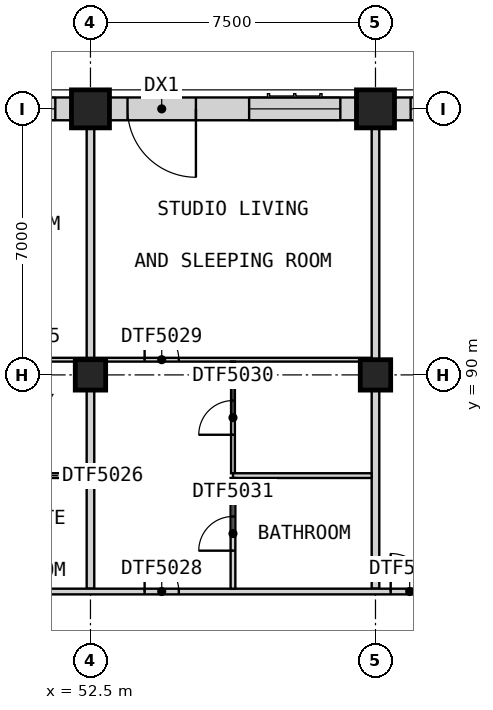
"""IFC4 building model, lengths in metres.
Left out: names, types, materials, properties, quantities, classifications, styles, units other than length and angle.
Written with IfcOpenShell. Run it as: python <this file> out.ifc"""

import sys

from ifc_helpers import new_model, si_unit, direction, frame, frame_2d, origin, origin_2d, place, context, subcontext, project, spatial, rectangle, extrude, element, fill, save


model = new_model("IFC4")
c1 = context("Model", 3, precision=1e-05, world=origin(), true_north=direction((0.0, 1.0)))
c2 = subcontext(c1, "Body", "Model", "MODEL_VIEW")
j1 = project(units=[si_unit("LENGTHUNIT", "METRE"), si_unit("PLANEANGLEUNIT", "RADIAN")], contexts=[c1])
p1 = place(None, origin())
s1 = spatial("IfcSite", under=j1, at=p1, CompositionType="ELEMENT")
p2 = place(p1, origin())
s2 = spatial("IfcBuilding", under=s1, at=p2, CompositionType="ELEMENT")
p3 = place(p2, frame((0.0, 0.0, 219.7)))
s3 = spatial("IfcBuildingStorey", under=s2, at=p3, CompositionType="ELEMENT", Elevation=219.7)
p4 = place(p3, frame((52.5, 90.0, 0.0), z_axis=(0.0, 0.0, 1.0), x_axis=(1.0, 0.0, 0.0)))
e1 = element("IfcColumn", 1, at=p4, inside=s3, PredefinedType="COLUMN", context=c2, shape_type="SweptSolid", body=[
    extrude(rectangle(XDim=0.8, YDim=0.8, at=origin_2d()), origin(), (0.0, 0.0, 1.0), 3.5),
])
p5 = place(p3, frame((52.5, 97.0, 0.0), z_axis=(0.0, 0.0, 1.0), x_axis=(1.0, 0.0, 0.0)))
e2 = element("IfcColumn", 2, at=p5, inside=s3, PredefinedType="COLUMN", context=c2, shape_type="SweptSolid", body=[
    extrude(rectangle(XDim=1.0, YDim=1.0, at=origin_2d()), origin(), (0.0, 0.0, 1.0), 3.5),
])
p6 = place(p3, frame((60.0, 90.0, 0.0), z_axis=(0.0, 0.0, 1.0), x_axis=(1.0, 0.0, 0.0)))
e3 = element("IfcColumn", 3, at=p6, inside=s3, PredefinedType="COLUMN", context=c2, shape_type="SweptSolid", body=[
    extrude(rectangle(XDim=0.8, YDim=0.8, at=origin_2d()), origin(), (0.0, 0.0, 1.0), 3.5),
])
p7 = place(p3, frame((60.0, 97.0, 0.0), z_axis=(0.0, 0.0, 1.0), x_axis=(1.0, 0.0, 0.0)))
e4 = element("IfcColumn", 4, at=p7, inside=s3, PredefinedType="COLUMN", context=c2, shape_type="SweptSolid", body=[
    extrude(rectangle(XDim=1.0, YDim=1.0, at=origin_2d()), origin(), (0.0, 0.0, 1.0), 3.5),
])
p8 = place(p3, frame((67.0, 97.0, 0.0), z_axis=(0.0, 0.0, 1.0), x_axis=(-1.0, 0.0, 0.0)))
e5 = element("IfcWall", 5, at=p8, inside=s3, PredefinedType="SOLIDWALL", context=c2, shape_type="SweptSolid", body=[
    extrude(rectangle(XDim=6.5, YDim=0.6, at=frame_2d((3.25, 0.0))), origin(), (0.0, 0.0, 1.0), 2.75),
])
p9 = place(p8, frame((3.675, 0.0, 0.8)))
e6 = element("IfcOpeningElement", 6, at=p9, cuts=e5, PredefinedType="OPENING", context=c2, shape_type="SweptSolid", body=[
    extrude(rectangle(XDim=2.4, YDim=1.8, at=frame_2d((1.2, 0.9))), frame((0.0, 0.31, 0.0), z_axis=(0.0, -1.0, 0.0), x_axis=(1.0, 0.0, 0.0)), (0.0, 0.0, 1.0), 0.62),
])
p10 = place(p8, frame((0.425, 0.0, 0.8)))
e7 = element("IfcOpeningElement", 7, at=p10, cuts=e5, PredefinedType="OPENING", context=c2, shape_type="SweptSolid", body=[
    extrude(rectangle(XDim=2.4, YDim=1.8, at=frame_2d((1.2, 0.9))), frame((0.0, 0.31, 0.0), z_axis=(0.0, -1.0, 0.0), x_axis=(1.0, 0.0, 0.0)), (0.0, 0.0, 1.0), 0.62),
])
p11 = place(p3, frame((59.5, 97.0, 0.0), z_axis=(0.0, 0.0, 1.0), x_axis=(-1.0, 0.0, 0.0)))
e8 = element("IfcWall", 8, at=p11, inside=s3, PredefinedType="SOLIDWALL", context=c2, shape_type="SweptSolid", body=[
    extrude(rectangle(XDim=6.5, YDim=0.6, at=frame_2d((3.25, 0.0))), origin(), (0.0, 0.0, 1.0), 2.75),
])
p12 = place(p11, frame((4.225, 0.0, 0.0)))
e9 = element("IfcOpeningElement", 9, at=p12, cuts=e8, PredefinedType="OPENING", context=c2, shape_type="SweptSolid", body=[
    extrude(rectangle(XDim=1.8, YDim=2.4, at=frame_2d((0.9, 1.2))), frame((0.0, 0.31, 0.0), z_axis=(0.0, -1.0, 0.0), x_axis=(1.0, 0.0, 0.0)), (0.0, 0.0, 1.0), 0.62),
])
p13 = place(p11, frame((0.425, 0.0, 0.8)))
e10 = element("IfcOpeningElement", 10, at=p13, cuts=e8, PredefinedType="OPENING", context=c2, shape_type="SweptSolid", body=[
    extrude(rectangle(XDim=2.4, YDim=1.8, at=frame_2d((1.2, 0.9))), frame((0.0, 0.31, 0.0), z_axis=(0.0, -1.0, 0.0), x_axis=(1.0, 0.0, 0.0)), (0.0, 0.0, 1.0), 0.62),
])
p14 = place(p3, frame((52.0, 97.0, 0.0), z_axis=(0.0, 0.0, 1.0), x_axis=(-1.0, 0.0, 0.0)))
e11 = element("IfcWall", 11, at=p14, inside=s3, PredefinedType="SOLIDWALL", context=c2, shape_type="SweptSolid", body=[
    extrude(rectangle(XDim=6.5, YDim=0.6, at=frame_2d((3.25, 0.0))), origin(), (0.0, 0.0, 1.0), 2.75),
])
p15 = place(p14, frame((3.675, 0.0, 0.8)))
e12 = element("IfcOpeningElement", 12, at=p15, cuts=e11, PredefinedType="OPENING", context=c2, shape_type="SweptSolid", body=[
    extrude(rectangle(XDim=2.4, YDim=1.8, at=frame_2d((1.2, 0.9))), frame((0.0, 0.31, 0.0), z_axis=(0.0, -1.0, 0.0), x_axis=(1.0, 0.0, 0.0)), (0.0, 0.0, 1.0), 0.62),
])
p16 = place(p14, frame((0.425, 0.0, 0.8)))
e13 = element("IfcOpeningElement", 13, at=p16, cuts=e11, PredefinedType="OPENING", context=c2, shape_type="SweptSolid", body=[
    extrude(rectangle(XDim=2.4, YDim=1.8, at=frame_2d((1.2, 0.9))), frame((0.0, 0.31, 0.0), z_axis=(0.0, -1.0, 0.0), x_axis=(1.0, 0.0, 0.0)), (0.0, 0.0, 1.0), 0.62),
])
for number, where, z_axis, x_axis in (
    (14, (52.5, 84.375, 0.0), (0.0, 0.0, 1.0), (0.0, 1.0, 0.0)),
    (15, (60.0, 84.375, 0.0), (0.0, 0.0, 1.0), (0.0, 1.0, 0.0)),
):
    element("IfcWall", number, at=place(p3, frame(where, z_axis=z_axis, x_axis=x_axis)), inside=s3, PredefinedType="PARTITIONING", context=c2, shape_type="SweptSolid", body=[
        extrude(rectangle(XDim=13.125, YDim=0.2, at=frame_2d((6.562, 0.0))), origin(), (0.0, 0.0, 1.0), 3.25),
    ])
p17 = place(p3, frame((33.75, 84.3, 0.0), z_axis=(0.0, 0.0, 1.0), x_axis=(1.0, 0.0, 0.0)))
e16 = element("IfcWall", 16, at=p17, inside=s3, PredefinedType="PARTITIONING", context=c2, shape_type="SweptSolid", body=[
    extrude(rectangle(XDim=28.05, YDim=0.15, at=frame_2d((14.025, 0.0))), origin(), (0.0, 0.0, 1.0), 3.25),
])
p18 = place(p17, frame((3.25, 0.0, 0.0)))
e17 = element("IfcOpeningElement", 17, at=p18, cuts=e16, PredefinedType="OPENING", context=c2, shape_type="SweptSolid", body=[
    extrude(rectangle(XDim=1.0, YDim=2.1, at=frame_2d((0.5, 1.05))), frame((0.0, 0.085, 0.0), z_axis=(0.0, -1.0, 0.0), x_axis=(1.0, 0.0, 0.0)), (0.0, 0.0, 1.0), 0.17),
])
p19 = place(p17, frame((8.925, 0.0, 0.0)))
e18 = element("IfcOpeningElement", 18, at=p19, cuts=e16, PredefinedType="OPENING", context=c2, shape_type="SweptSolid", body=[
    extrude(rectangle(XDim=0.9, YDim=2.1, at=frame_2d((0.45, 1.05))), frame((0.0, 0.085, 0.0), z_axis=(0.0, -1.0, 0.0), x_axis=(1.0, 0.0, 0.0)), (0.0, 0.0, 1.0), 0.17),
])
p20 = place(p17, frame((20.175, 0.0, 0.0)))
e19 = element("IfcOpeningElement", 19, at=p20, cuts=e16, PredefinedType="OPENING", context=c2, shape_type="SweptSolid", body=[
    extrude(rectangle(XDim=0.9, YDim=2.1, at=frame_2d((0.45, 1.05))), frame((0.0, 0.085, 0.0), z_axis=(0.0, -1.0, 0.0), x_axis=(1.0, 0.0, 0.0)), (0.0, 0.0, 1.0), 0.17),
])
p21 = place(p17, frame((26.65, 0.0, 0.0)))
e20 = element("IfcOpeningElement", 20, at=p21, cuts=e16, PredefinedType="OPENING", context=c2, shape_type="SweptSolid", body=[
    extrude(rectangle(XDim=1.0, YDim=2.1, at=frame_2d((0.5, 1.05))), frame((0.0, 0.085, 0.0), z_axis=(0.0, -1.0, 0.0), x_axis=(1.0, 0.0, 0.0)), (0.0, 0.0, 1.0), 0.17),
])
p22 = place(p3, frame((41.35, 90.4, 0.0), z_axis=(0.0, 0.0, 1.0), x_axis=(1.0, 0.0, 0.0)))
e21 = element("IfcWall", 21, at=p22, inside=s3, PredefinedType="PARTITIONING", context=c2, shape_type="SweptSolid", body=[
    extrude(rectangle(XDim=18.55, YDim=0.1, at=frame_2d((9.275, 0.0))), origin(), (0.0, 0.0, 1.0), 3.25),
])
p23 = place(p22, frame((1.325, 0.0, 0.0)))
e22 = element("IfcOpeningElement", 22, at=p23, cuts=e21, PredefinedType="OPENING", context=c2, shape_type="SweptSolid", body=[
    extrude(rectangle(XDim=0.9, YDim=2.1, at=frame_2d((0.45, 1.05))), frame((0.0, 0.06, 0.0), z_axis=(0.0, -1.0, 0.0), x_axis=(1.0, 0.0, 0.0)), (0.0, 0.0, 1.0), 0.12),
])
p24 = place(p22, frame((8.825, 0.0, 0.0)))
e23 = element("IfcOpeningElement", 23, at=p24, cuts=e21, PredefinedType="OPENING", context=c2, shape_type="SweptSolid", body=[
    extrude(rectangle(XDim=0.9, YDim=2.1, at=frame_2d((0.45, 1.05))), frame((0.0, 0.06, 0.0), z_axis=(0.0, -1.0, 0.0), x_axis=(1.0, 0.0, 0.0)), (0.0, 0.0, 1.0), 0.12),
])
p25 = place(p22, frame((12.575, 0.0, 0.0)))
e24 = element("IfcOpeningElement", 24, at=p25, cuts=e21, PredefinedType="OPENING", context=c2, shape_type="SweptSolid", body=[
    extrude(rectangle(XDim=0.9, YDim=2.1, at=frame_2d((0.45, 1.05))), frame((0.0, 0.06, 0.0), z_axis=(0.0, -1.0, 0.0), x_axis=(1.0, 0.0, 0.0)), (0.0, 0.0, 1.0), 0.12),
])
p26 = place(p3, frame((56.25, 87.413, 0.0), z_axis=(0.0, 0.0, 1.0), x_axis=(0.0, 1.0, 0.0)))
e25 = element("IfcWall", 25, at=p26, inside=s3, PredefinedType="PARTITIONING", context=c2, shape_type="SweptSolid", body=[
    extrude(rectangle(XDim=2.938, YDim=0.1, at=frame_2d((1.469, 0.0))), origin(), (0.0, 0.0, 1.0), 3.25),
])
p27 = place(p26, frame((1.012, 0.0, 0.0)))
e26 = element("IfcOpeningElement", 26, at=p27, cuts=e25, PredefinedType="OPENING", context=c2, shape_type="SweptSolid", body=[
    extrude(rectangle(XDim=0.9, YDim=2.1, at=frame_2d((0.45, 1.05))), frame((0.0, 0.06, 0.0), z_axis=(0.0, -1.0, 0.0), x_axis=(1.0, 0.0, 0.0)), (0.0, 0.0, 1.0), 0.12),
])
p28 = place(p3, frame((45.0, 87.35, 0.0), z_axis=(0.0, 0.0, 1.0), x_axis=(1.0, 0.0, 0.0)))
e27 = element("IfcWall", 27, at=p28, inside=s3, PredefinedType="PARTITIONING", context=c2, shape_type="SweptSolid", body=[
    extrude(rectangle(XDim=7.4, YDim=0.125, at=frame_2d((3.7, 0.0))), origin(), (0.0, 0.0, 1.0), 3.25),
])
p29 = place(p28, frame((5.175, 0.0, 0.0)))
e28 = element("IfcOpeningElement", 28, at=p29, cuts=e27, PredefinedType="OPENING", context=c2, shape_type="SweptSolid", body=[
    extrude(rectangle(XDim=0.9, YDim=2.1, at=frame_2d((0.45, 1.05))), frame((0.0, 0.073, 0.0), z_axis=(0.0, -1.0, 0.0), x_axis=(1.0, 0.0, 0.0)), (0.0, 0.0, 1.0), 0.145),
])
p30 = place(p3, frame((56.25, 87.35, 0.0), z_axis=(0.0, 0.0, 1.0), x_axis=(1.0, 0.0, 0.0)))
e29 = element("IfcWall", 29, at=p30, inside=s3, PredefinedType="PARTITIONING", context=c2, shape_type="SweptSolid", body=[
    extrude(rectangle(XDim=3.65, YDim=0.125, at=frame_2d((1.825, 0.0))), origin(), (0.0, 0.0, 1.0), 3.25),
])
p31 = place(p3, frame((56.25, 84.375, 0.0), z_axis=(0.0, 0.0, 1.0), x_axis=(0.0, 1.0, 0.0)))
e30 = element("IfcWall", 30, at=p31, inside=s3, PredefinedType="PARTITIONING", context=c2, shape_type="SweptSolid", body=[
    extrude(rectangle(XDim=2.913, YDim=0.125, at=frame_2d((1.456, 0.0))), origin(), (0.0, 0.0, 1.0), 3.25),
])
p32 = place(p31, frame((1.0, 0.0, 0.0)))
e31 = element("IfcOpeningElement", 31, at=p32, cuts=e30, PredefinedType="OPENING", context=c2, shape_type="SweptSolid", body=[
    extrude(rectangle(XDim=0.9, YDim=2.1, at=frame_2d((0.45, 1.05))), frame((0.0, 0.073, 0.0), z_axis=(0.0, -1.0, 0.0), x_axis=(1.0, 0.0, 0.0)), (0.0, 0.0, 1.0), 0.145),
])
p33 = place(p9, origin())
e32 = element("IfcWindow", 32, at=p33, inside=s3, PartitioningType="SINGLE_PANEL", PredefinedType="WINDOW", context=c2, shape_type="SweptSolid", body=[
    extrude(rectangle(XDim=2.4, YDim=1.8, at=frame_2d((1.2, 0.9))), frame((0.0, -0.07, 0.0), z_axis=(0.0, -1.0, 0.0), x_axis=(1.0, 0.0, 0.0)), (0.0, 0.0, 1.0), 0.06),
])
fill(e6, e32)
p34 = place(p12, origin())
e33 = element("IfcDoor", 33, at=p34, inside=s3, OperationType="SINGLE_SWING_LEFT", PredefinedType="DOOR", context=c2, shape_type="SweptSolid", body=[
    extrude(rectangle(XDim=1.8, YDim=2.4, at=frame_2d((0.9, 1.2))), frame((0.0, -0.075, 0.0), z_axis=(0.0, -1.0, 0.0), x_axis=(1.0, 0.0, 0.0)), (0.0, 0.0, 1.0), 0.05),
])
fill(e9, e33)
p35 = place(p13, origin())
e34 = element("IfcWindow", 34, at=p35, inside=s3, PartitioningType="SINGLE_PANEL", PredefinedType="WINDOW", context=c2, shape_type="SweptSolid", body=[
    extrude(rectangle(XDim=2.4, YDim=1.8, at=frame_2d((1.2, 0.9))), frame((0.0, -0.07, 0.0), z_axis=(0.0, -1.0, 0.0), x_axis=(1.0, 0.0, 0.0)), (0.0, 0.0, 1.0), 0.06),
])
fill(e10, e34)
p36 = place(p16, origin())
e35 = element("IfcWindow", 35, at=p36, inside=s3, PartitioningType="SINGLE_PANEL", PredefinedType="WINDOW", context=c2, shape_type="SweptSolid", body=[
    extrude(rectangle(XDim=2.4, YDim=1.8, at=frame_2d((1.2, 0.9))), frame((0.0, -0.07, 0.0), z_axis=(0.0, -1.0, 0.0), x_axis=(1.0, 0.0, 0.0)), (0.0, 0.0, 1.0), 0.06),
])
fill(e13, e35)
p37 = place(p20, origin())
e36 = element("IfcDoor", 36, at=p37, inside=s3, OperationType="SINGLE_SWING_LEFT", PredefinedType="DOOR", context=c2, shape_type="SweptSolid", body=[
    extrude(rectangle(XDim=0.9, YDim=2.1, at=frame_2d((0.45, 1.05))), frame((0.0, 0.025, 0.0), z_axis=(0.0, -1.0, 0.0), x_axis=(1.0, 0.0, 0.0)), (0.0, 0.0, 1.0), 0.05),
])
fill(e19, e36)
p38 = place(p25, origin())
e37 = element("IfcDoor", 37, at=p38, inside=s3, OperationType="SINGLE_SWING_RIGHT", PredefinedType="DOOR", context=c2, shape_type="SweptSolid", body=[
    extrude(rectangle(XDim=0.9, YDim=2.1, at=frame_2d((0.45, 1.05))), frame((0.0, 0.025, 0.0), z_axis=(0.0, -1.0, 0.0), x_axis=(1.0, 0.0, 0.0)), (0.0, 0.0, 1.0), 0.05),
])
fill(e24, e37)
p39 = place(p27, origin())
e38 = element("IfcDoor", 38, at=p39, inside=s3, OperationType="SINGLE_SWING_RIGHT", PredefinedType="DOOR", context=c2, shape_type="SweptSolid", body=[
    extrude(rectangle(XDim=0.9, YDim=2.1, at=frame_2d((0.45, 1.05))), frame((0.0, 0.025, 0.0), z_axis=(0.0, -1.0, 0.0), x_axis=(1.0, 0.0, 0.0)), (0.0, 0.0, 1.0), 0.05),
])
fill(e26, e38)
p40 = place(p32, origin())
e39 = element("IfcDoor", 39, at=p40, inside=s3, OperationType="SINGLE_SWING_LEFT", PredefinedType="DOOR", context=c2, shape_type="SweptSolid", body=[
    extrude(rectangle(XDim=0.9, YDim=2.1, at=frame_2d((0.45, 1.05))), frame((0.0, 0.025, 0.0), z_axis=(0.0, -1.0, 0.0), x_axis=(1.0, 0.0, 0.0)), (0.0, 0.0, 1.0), 0.05),
])
fill(e31, e39)
p41 = place(p21, origin())
e40 = element("IfcDoor", 40, at=p41, inside=s3, OperationType="SINGLE_SWING_LEFT", PredefinedType="DOOR", context=c2, shape_type="SweptSolid", body=[
    extrude(rectangle(XDim=1.0, YDim=2.1, at=frame_2d((0.5, 1.05))), frame((0.0, 0.025, 0.0), z_axis=(0.0, -1.0, 0.0), x_axis=(1.0, 0.0, 0.0)), (0.0, 0.0, 1.0), 0.05),
])
fill(e20, e40)
save(model, sys.argv[1])
